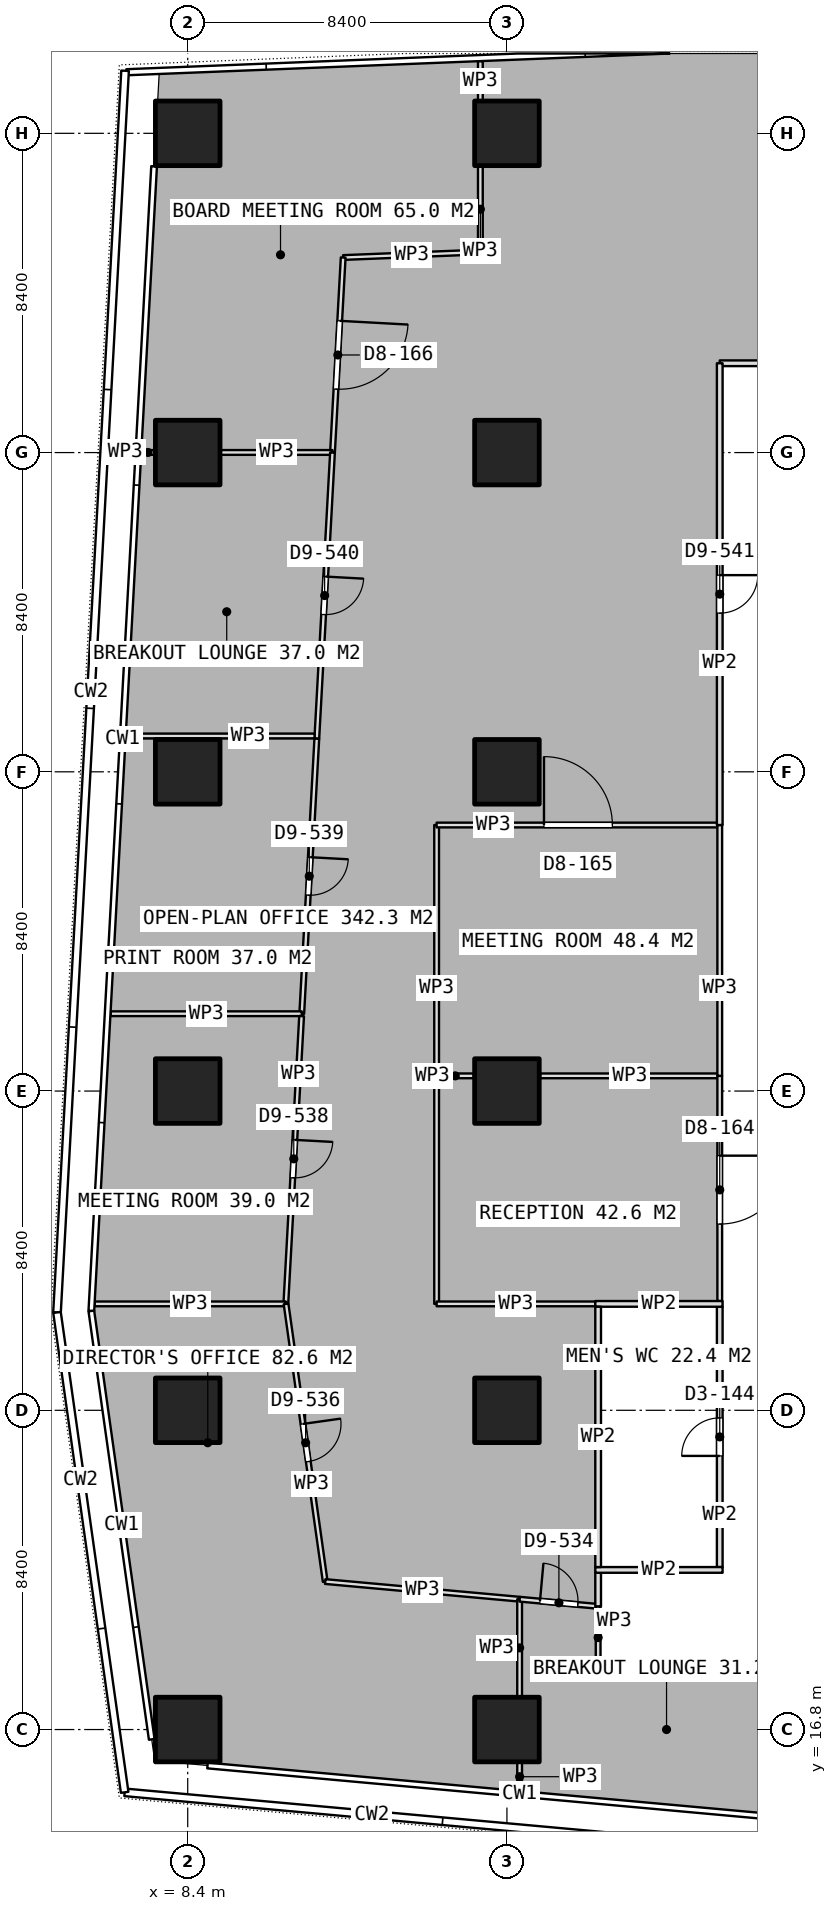
"""IFC4 building model, lengths in metres.
Left out: names, types, materials, properties, quantities, classifications, styles, units other than length and angle.
Written with IfcOpenShell. Run it as: python <this file> out.ifc"""

import sys

from ifc_helpers import new_model, si_unit, direction, frame, frame_2d, origin, origin_2d, place, context, subcontext, project, spatial, rectangle, extrude, element, fill, save


model = new_model("IFC4")
c1 = context("Model", 3, precision=1e-05, world=origin(), true_north=direction((0.0, 1.0)))
c2 = subcontext(c1, "Body", "Model", "MODEL_VIEW")
j1 = project(units=[si_unit("LENGTHUNIT", "METRE"), si_unit("PLANEANGLEUNIT", "RADIAN")], contexts=[c1])
p1 = place(None, origin())
s1 = spatial("IfcSite", under=j1, at=p1, CompositionType="ELEMENT")
p2 = place(p1, origin())
s2 = spatial("IfcBuilding", under=s1, at=p2, CompositionType="ELEMENT")
p3 = place(p2, frame((0.0, 0.0, 136.55)))
s3 = spatial("IfcBuildingStorey", under=s2, at=p3, CompositionType="ELEMENT", Elevation=136.55)
for number, where, z_axis, x_axis in (
    (1, (8.4, 16.8, 0.0), (0.0, 0.0, 1.0), (1.0, 0.0, 0.0)),
    (2, (8.4, 25.2, 0.0), (0.0, 0.0, 1.0), (1.0, 0.0, 0.0)),
    (3, (8.4, 33.6, 0.0), (0.0, 0.0, 1.0), (1.0, 0.0, 0.0)),
    (4, (8.4, 42.0, 0.0), (0.0, 0.0, 1.0), (1.0, 0.0, 0.0)),
    (5, (8.4, 50.4, 0.0), (0.0, 0.0, 1.0), (1.0, 0.0, 0.0)),
    (6, (8.4, 58.8, 0.0), (0.0, 0.0, 1.0), (1.0, 0.0, 0.0)),
    (7, (16.8, 16.8, 0.0), (0.0, 0.0, 1.0), (1.0, 0.0, 0.0)),
    (8, (16.8, 25.2, 0.0), (0.0, 0.0, 1.0), (1.0, 0.0, 0.0)),
    (9, (16.8, 33.6, 0.0), (0.0, 0.0, 1.0), (1.0, 0.0, 0.0)),
    (10, (16.8, 42.0, 0.0), (0.0, 0.0, 1.0), (1.0, 0.0, 0.0)),
    (11, (16.8, 50.4, 0.0), (0.0, 0.0, 1.0), (1.0, 0.0, 0.0)),
    (12, (16.8, 58.8, 0.0), (0.0, 0.0, 1.0), (1.0, 0.0, 0.0)),
):
    element("IfcColumn", number, at=place(p3, frame(where, z_axis=z_axis, x_axis=x_axis)), inside=s3, PredefinedType="COLUMN", context=c2, shape_type="SweptSolid", body=[
        extrude(rectangle(XDim=1.7, YDim=1.7, at=origin_2d()), origin(), (0.0, 0.0, 1.0), 3.75),
    ])
for number, where, z_axis, x_axis in (
    (13, (19.125, 21.0, 0.0), (0.0, 0.0, 1.0), (1.0, 0.0, 0.0)),
    (14, (19.125, 28.0, 0.0), (0.0, 0.0, 1.0), (1.0, 0.0, 0.0)),
):
    element("IfcWall", number, at=place(p3, frame(where, z_axis=z_axis, x_axis=x_axis)), inside=s3, PredefinedType="PARTITIONING", context=c2, shape_type="SweptSolid", body=[
        extrude(rectangle(XDim=3.35, YDim=0.15, at=frame_2d((1.675, 0.0))), origin(), (0.0, 0.0, 1.0), 3.5),
    ])
p4 = place(p3, frame((19.2, 21.075, 0.0), z_axis=(0.0, 0.0, 1.0), x_axis=(0.0, 1.0, 0.0)))
e15 = element("IfcWall", 15, at=p4, inside=s3, PredefinedType="PARTITIONING", context=c2, shape_type="SweptSolid", body=[
    extrude(rectangle(XDim=6.85, YDim=0.15, at=frame_2d((3.425, 0.0))), origin(), (0.0, 0.0, 1.0), 3.5),
])
p5 = place(p3, frame((22.4, 21.075, 0.0), z_axis=(0.0, 0.0, 1.0), x_axis=(0.0, 1.0, 0.0)))
e16 = element("IfcWall", 16, at=p5, inside=s3, PredefinedType="PARTITIONING", context=c2, shape_type="SweptSolid", body=[
    extrude(rectangle(XDim=6.85, YDim=0.15, at=frame_2d((3.425, 0.0))), origin(), (0.0, 0.0, 1.0), 3.5),
])
p6 = place(p5, frame((2.925, 0.0, 0.0)))
e17 = element("IfcOpeningElement", 17, at=p6, cuts=e16, PredefinedType="OPENING", context=c2, shape_type="SweptSolid", body=[
    extrude(rectangle(XDim=1.0, YDim=2.1, at=frame_2d((0.5, 1.05))), frame((0.0, 0.085, 0.0), z_axis=(0.0, -1.0, 0.0), x_axis=(1.0, 0.0, 0.0)), (0.0, 0.0, 1.0), 0.17),
])
p7 = place(p3, frame((16.101, 60.7, 0.0), z_axis=(0.0, 0.0, 1.0), x_axis=(0.0, -1.0, 0.0)))
e18 = element("IfcWall", 18, at=p7, inside=s3, PredefinedType="PARTITIONING", context=c2, shape_type="SweptSolid", body=[
    extrude(rectangle(XDim=1.03, YDim=0.125, at=frame_2d((0.515, 0.0))), origin(), (0.0, 0.0, 1.0), 3.5),
])
p8 = place(p3, frame((16.101, 57.93, 0.0), z_axis=(0.0, 0.0, 1.0), x_axis=(0.0, -1.0, 0.0)))
e19 = element("IfcWall", 19, at=p8, inside=s3, PredefinedType="PARTITIONING", context=c2, shape_type="SweptSolid", body=[
    extrude(rectangle(XDim=2.254, YDim=0.125, at=frame_2d((1.127, 0.0))), origin(), (0.0, 0.0, 1.0), 3.5),
])
p9 = place(p3, frame((16.101, 55.676, 0.0), z_axis=(0.0, 0.0, 1.0), x_axis=(-0.999204947676, -0.039868189567, 0.0)))
e20 = element("IfcWall", 20, at=p9, inside=s3, PredefinedType="PARTITIONING", context=c2, shape_type="SweptSolid", body=[
    extrude(rectangle(XDim=3.613, YDim=0.125, at=frame_2d((1.807, 0.0))), origin(), (0.0, 0.0, 1.0), 3.5),
])
p10 = place(p3, frame((12.491, 55.532, 0.0), z_axis=(0.0, 0.0, 1.0), x_axis=(-0.054706604425, -0.998502472422, 0.0)))
e21 = element("IfcWall", 21, at=p10, inside=s3, PredefinedType="PARTITIONING", context=c2, shape_type="SweptSolid", body=[
    extrude(rectangle(XDim=5.137, YDim=0.125, at=frame_2d((2.568, 0.0))), origin(), (0.0, 0.0, 1.0), 3.5),
])
p11 = place(p10, frame((1.668, 0.0, 0.0)))
e22 = element("IfcOpeningElement", 22, at=p11, cuts=e21, PredefinedType="OPENING", context=c2, shape_type="SweptSolid", body=[
    extrude(rectangle(XDim=1.8, YDim=2.1, at=frame_2d((0.9, 1.05))), frame((0.0, 0.073, 0.0), z_axis=(0.0, -1.0, 0.0), x_axis=(1.0, 0.0, 0.0)), (0.0, 0.0, 1.0), 0.145),
])
p12 = place(p3, frame((12.21, 50.403, 0.0), z_axis=(0.0, 0.0, 1.0), x_axis=(-1.0, 0.0, 0.0)))
e23 = element("IfcWall", 23, at=p12, inside=s3, PredefinedType="PARTITIONING", context=c2, shape_type="SweptSolid", body=[
    extrude(rectangle(XDim=2.94, YDim=0.125, at=frame_2d((1.47, 0.0))), origin(), (0.0, 0.0, 1.0), 3.5),
])
p13 = place(p3, frame((7.53, 50.403, 0.0), z_axis=(0.0, 0.0, 1.0), x_axis=(-1.0, 0.0, 0.0)))
e24 = element("IfcWall", 24, at=p13, inside=s3, PredefinedType="PARTITIONING", context=c2, shape_type="SweptSolid", body=[
    extrude(rectangle(XDim=0.347, YDim=0.125, at=frame_2d((0.173, 0.0))), origin(), (0.0, 0.0, 1.0), 3.5),
])
p14 = place(p3, frame((12.21, 50.402, 0.0), z_axis=(0.0, 0.0, 1.0), x_axis=(-0.054750918435, -0.998500043531, 0.0)))
e25 = element("IfcWall", 25, at=p14, inside=s3, PredefinedType="PARTITIONING", context=c2, shape_type="SweptSolid", body=[
    extrude(rectangle(XDim=7.54, YDim=0.125, at=frame_2d((3.77, 0.0))), origin(), (0.0, 0.0, 1.0), 3.5),
])
p15 = place(p14, frame((3.27, 0.0, 0.0)))
e26 = element("IfcOpeningElement", 26, at=p15, cuts=e25, PredefinedType="OPENING", context=c2, shape_type="SweptSolid", body=[
    extrude(rectangle(XDim=1.0, YDim=2.1, at=frame_2d((0.5, 1.05))), frame((0.0, 0.073, 0.0), z_axis=(0.0, -1.0, 0.0), x_axis=(1.0, 0.0, 0.0)), (0.0, 0.0, 1.0), 0.145),
])
p16 = place(p3, frame((11.738, 42.943, 0.0), z_axis=(0.0, 0.0, 1.0), x_axis=(-1.0, 0.0, 0.0)))
e27 = element("IfcWall", 27, at=p16, inside=s3, PredefinedType="PARTITIONING", context=c2, shape_type="SweptSolid", body=[
    extrude(rectangle(XDim=4.994, YDim=0.125, at=frame_2d((2.497, 0.0))), origin(), (0.0, 0.0, 1.0), 3.5),
])
p17 = place(p3, frame((11.797, 42.872, 0.0), z_axis=(0.0, 0.0, 1.0), x_axis=(-0.0546696622, -0.998504495751, 0.0)))
e28 = element("IfcWall", 28, at=p17, inside=s3, PredefinedType="PARTITIONING", context=c2, shape_type="SweptSolid", body=[
    extrude(rectangle(XDim=7.248, YDim=0.125, at=frame_2d((3.624, 0.0))), origin(), (0.0, 0.0, 1.0), 3.5),
])
p18 = place(p17, frame((3.124, 0.0, 0.0)))
e29 = element("IfcOpeningElement", 29, at=p18, cuts=e28, PredefinedType="OPENING", context=c2, shape_type="SweptSolid", body=[
    extrude(rectangle(XDim=1.0, YDim=2.1, at=frame_2d((0.5, 1.05))), frame((0.0, 0.073, 0.0), z_axis=(0.0, -1.0, 0.0), x_axis=(1.0, 0.0, 0.0)), (0.0, 0.0, 1.0), 0.145),
])
p19 = place(p3, frame((11.401, 35.635, 0.0), z_axis=(0.0, 0.0, 1.0), x_axis=(-1.0, 0.0, 0.0)))
e30 = element("IfcWall", 30, at=p19, inside=s3, PredefinedType="PARTITIONING", context=c2, shape_type="SweptSolid", body=[
    extrude(rectangle(XDim=5.028, YDim=0.125, at=frame_2d((2.514, 0.0))), origin(), (0.0, 0.0, 1.0), 3.5),
])
p20 = place(p3, frame((11.397, 35.572, 0.0), z_axis=(0.0, 0.0, 1.0), x_axis=(-0.054730034511, -0.998501188443, 0.0)))
e31 = element("IfcWall", 31, at=p20, inside=s3, PredefinedType="PARTITIONING", context=c2, shape_type="SweptSolid", body=[
    extrude(rectangle(XDim=7.583, YDim=0.125, at=frame_2d((3.792, 0.0))), origin(), (0.0, 0.0, 1.0), 3.5),
])
p21 = place(p20, frame((3.261, 0.0, 0.0)))
e32 = element("IfcOpeningElement", 32, at=p21, cuts=e31, PredefinedType="OPENING", context=c2, shape_type="SweptSolid", body=[
    extrude(rectangle(XDim=1.0, YDim=2.1, at=frame_2d((0.5, 1.05))), frame((0.0, 0.073, 0.0), z_axis=(0.0, -1.0, 0.0), x_axis=(1.0, 0.0, 0.0)), (0.0, 0.0, 1.0), 0.145),
])
p22 = place(p3, frame((10.982, 28.0, 0.0), z_axis=(0.0, 0.0, 1.0), x_axis=(-1.0, 0.0, 0.0)))
e33 = element("IfcWall", 33, at=p22, inside=s3, PredefinedType="PARTITIONING", context=c2, shape_type="SweptSolid", body=[
    extrude(rectangle(XDim=5.028, YDim=0.125, at=frame_2d((2.514, 0.0))), origin(), (0.0, 0.0, 1.0), 3.5),
])
p23 = place(p3, frame((10.988, 27.999, 0.0), z_axis=(0.0, 0.0, 1.0), x_axis=(0.139623458625, -0.990204670662, 0.0)))
e34 = element("IfcWall", 34, at=p23, inside=s3, PredefinedType="PARTITIONING", context=c2, shape_type="SweptSolid", body=[
    extrude(rectangle(XDim=7.377, YDim=0.125, at=frame_2d((3.688, 0.0))), origin(), (0.0, 0.0, 1.0), 3.5),
])
p24 = place(p23, frame((3.189, 0.0, 0.0)))
e35 = element("IfcOpeningElement", 35, at=p24, cuts=e34, PredefinedType="OPENING", context=c2, shape_type="SweptSolid", body=[
    extrude(rectangle(XDim=1.0, YDim=2.1, at=frame_2d((0.5, 1.05))), frame((0.0, 0.073, 0.0), z_axis=(0.0, -1.0, 0.0), x_axis=(1.0, 0.0, 0.0)), (0.0, 0.0, 1.0), 0.145),
])
p25 = place(p3, frame((12.018, 20.694, 0.0), z_axis=(0.0, 0.0, 1.0), x_axis=(0.995893206468, -0.090535746043, 0.0)))
e36 = element("IfcWall", 36, at=p25, inside=s3, PredefinedType="PARTITIONING", context=c2, shape_type="SweptSolid", body=[
    extrude(rectangle(XDim=5.137, YDim=0.125, at=frame_2d((2.568, 0.0))), origin(), (0.0, 0.0, 1.0), 3.5),
])
p26 = place(p3, frame((17.134, 20.229, 0.0), z_axis=(0.0, 0.0, 1.0), x_axis=(0.0, -1.0, 0.0)))
e37 = element("IfcWall", 37, at=p26, inside=s3, PredefinedType="PARTITIONING", context=c2, shape_type="SweptSolid", body=[
    extrude(rectangle(XDim=2.559, YDim=0.125, at=frame_2d((1.28, 0.0))), origin(), (0.0, 0.0, 1.0), 3.5),
])
p27 = place(p3, frame((17.134, 15.93, 0.0), z_axis=(0.0, 0.0, 1.0), x_axis=(0.0, -1.0, 0.0)))
e38 = element("IfcWall", 38, at=p27, inside=s3, PredefinedType="PARTITIONING", context=c2, shape_type="SweptSolid", body=[
    extrude(rectangle(XDim=0.742, YDim=0.125, at=frame_2d((0.371, 0.0))), origin(), (0.0, 0.0, 1.0), 3.5),
])
p28 = place(p3, frame((19.2, 18.4, 0.0), z_axis=(0.0, 0.0, 1.0), x_axis=(1.0, 0.0, 0.0)))
e39 = element("IfcWall", 39, at=p28, inside=s3, PredefinedType="PARTITIONING", context=c2, shape_type="SweptSolid", body=[
    extrude(rectangle(XDim=6.179, YDim=0.125, at=frame_2d((3.089, 0.0))), origin(), (0.0, 0.0, 1.0), 3.5),
])
p29 = place(p3, frame((17.135, 20.229, 0.0), z_axis=(0.0, 0.0, 1.0), x_axis=(0.995881616909, -0.090663140816, 0.0)))
e40 = element("IfcWall", 40, at=p29, inside=s3, PredefinedType="PARTITIONING", context=c2, shape_type="SweptSolid", body=[
    extrude(rectangle(XDim=2.073, YDim=0.125, at=frame_2d((1.037, 0.0))), origin(), (0.0, 0.0, 1.0), 3.5),
])
p30 = place(p29, frame((0.537, 0.0, 0.0)))
e41 = element("IfcOpeningElement", 41, at=p30, cuts=e40, PredefinedType="OPENING", context=c2, shape_type="SweptSolid", body=[
    extrude(rectangle(XDim=1.0, YDim=2.1, at=frame_2d((0.5, 1.05))), frame((0.0, 0.073, 0.0), z_axis=(0.0, -1.0, 0.0), x_axis=(1.0, 0.0, 0.0)), (0.0, 0.0, 1.0), 0.145),
])
p31 = place(p3, frame((19.2, 20.041, 0.0), z_axis=(0.0, 0.0, 1.0), x_axis=(0.0, -1.0, 0.0)))
e42 = element("IfcWall", 42, at=p31, inside=s3, PredefinedType="PARTITIONING", context=c2, shape_type="SweptSolid", body=[
    extrude(rectangle(XDim=1.641, YDim=0.125, at=frame_2d((0.821, 0.0))), origin(), (0.0, 0.0, 1.0), 3.5),
])
p32 = place(p3, frame((14.95, 28.0, 0.0), z_axis=(0.0, 0.0, 1.0), x_axis=(0.0, 1.0, 0.0)))
e43 = element("IfcWall", 43, at=p32, inside=s3, PredefinedType="PARTITIONING", context=c2, shape_type="SweptSolid", body=[
    extrude(rectangle(XDim=6.0, YDim=0.125, at=frame_2d((3.0, 0.0))), origin(), (0.0, 0.0, 1.0), 3.5),
])
p33 = place(p3, frame((14.95, 34.0, 0.0), z_axis=(0.0, 0.0, 1.0), x_axis=(1.0, 0.0, 0.0)))
e44 = element("IfcWall", 44, at=p33, inside=s3, PredefinedType="PARTITIONING", context=c2, shape_type="SweptSolid", body=[
    extrude(rectangle(XDim=0.98, YDim=0.125, at=frame_2d((0.49, 0.0))), origin(), (0.0, 0.0, 1.0), 3.5),
])
p34 = place(p3, frame((17.67, 34.0, 0.0), z_axis=(0.0, 0.0, 1.0), x_axis=(1.0, 0.0, 0.0)))
e45 = element("IfcWall", 45, at=p34, inside=s3, PredefinedType="PARTITIONING", context=c2, shape_type="SweptSolid", body=[
    extrude(rectangle(XDim=4.73, YDim=0.125, at=frame_2d((2.365, 0.0))), origin(), (0.0, 0.0, 1.0), 3.5),
])
p35 = place(p3, frame((22.4, 34.0, 0.0), z_axis=(0.0, 0.0, 1.0), x_axis=(0.0, -1.0, 0.0)))
e46 = element("IfcWall", 46, at=p35, inside=s3, PredefinedType="PARTITIONING", context=c2, shape_type="SweptSolid", body=[
    extrude(rectangle(XDim=5.925, YDim=0.125, at=frame_2d((2.962, 0.0))), origin(), (0.0, 0.0, 1.0), 3.5),
])
p36 = place(p35, frame((2.1, 0.0, 0.0)))
e47 = element("IfcOpeningElement", 47, at=p36, cuts=e46, PredefinedType="OPENING", context=c2, shape_type="SweptSolid", body=[
    extrude(rectangle(XDim=1.8, YDim=2.1, at=frame_2d((0.9, 1.05))), frame((0.0, 0.073, 0.0), z_axis=(0.0, -1.0, 0.0), x_axis=(1.0, 0.0, 0.0)), (0.0, 0.0, 1.0), 0.145),
])
p37 = place(p3, frame((19.125, 28.0, 0.0), z_axis=(0.0, 0.0, 1.0), x_axis=(-1.0, 0.0, 0.0)))
e48 = element("IfcWall", 48, at=p37, inside=s3, PredefinedType="PARTITIONING", context=c2, shape_type="SweptSolid", body=[
    extrude(rectangle(XDim=4.175, YDim=0.125, at=frame_2d((2.087, 0.0))), origin(), (0.0, 0.0, 1.0), 3.5),
])
p38 = place(p3, frame((14.95, 34.0, 0.0), z_axis=(0.0, 0.0, 1.0), x_axis=(0.0, 1.0, 0.0)))
e49 = element("IfcWall", 49, at=p38, inside=s3, PredefinedType="PARTITIONING", context=c2, shape_type="SweptSolid", body=[
    extrude(rectangle(XDim=6.6, YDim=0.125, at=frame_2d((3.3, 0.0))), origin(), (0.0, 0.0, 1.0), 3.5),
])
p39 = place(p3, frame((14.95, 40.6, 0.0), z_axis=(0.0, 0.0, 1.0), x_axis=(1.0, 0.0, 0.0)))
e50 = element("IfcWall", 50, at=p39, inside=s3, PredefinedType="PARTITIONING", context=c2, shape_type="SweptSolid", body=[
    extrude(rectangle(XDim=7.45, YDim=0.125, at=frame_2d((3.725, 0.0))), origin(), (0.0, 0.0, 1.0), 3.5),
])
p40 = place(p39, frame((2.825, 0.0, 0.0)))
e51 = element("IfcOpeningElement", 51, at=p40, cuts=e50, PredefinedType="OPENING", context=c2, shape_type="SweptSolid", body=[
    extrude(rectangle(XDim=1.8, YDim=2.1, at=frame_2d((0.9, 1.05))), frame((0.0, 0.073, 0.0), z_axis=(0.0, -1.0, 0.0), x_axis=(1.0, 0.0, 0.0)), (0.0, 0.0, 1.0), 0.145),
])
p41 = place(p3, frame((22.4, 40.6, 0.0), z_axis=(0.0, 0.0, 1.0), x_axis=(0.0, -1.0, 0.0)))
e52 = element("IfcWall", 52, at=p41, inside=s3, PredefinedType="PARTITIONING", context=c2, shape_type="SweptSolid", body=[
    extrude(rectangle(XDim=6.6, YDim=0.125, at=frame_2d((3.3, 0.0))), origin(), (0.0, 0.0, 1.0), 3.5),
])
p42 = place(p3, frame((33.826, 52.75, 0.0), z_axis=(0.0, 0.0, 1.0), x_axis=(-1.0, 0.0, 0.0)))
e53 = element("IfcWall", 53, at=p42, inside=s3, PredefinedType="PARTITIONING", context=c2, shape_type="SweptSolid", body=[
    extrude(rectangle(XDim=11.426, YDim=0.15, at=frame_2d((5.713, 0.0))), origin(), (0.0, 0.0, 1.0), 3.5),
])
p43 = place(p3, frame((22.4, 52.75, 0.0), z_axis=(0.0, 0.0, 1.0), x_axis=(0.0, -1.0, 0.0)))
e54 = element("IfcWall", 54, at=p43, inside=s3, PredefinedType="PARTITIONING", context=c2, shape_type="SweptSolid", body=[
    extrude(rectangle(XDim=12.15, YDim=0.15, at=frame_2d((6.075, 0.0))), origin(), (0.0, 0.0, 1.0), 3.5),
])
p44 = place(p43, frame((5.575, 0.0, 0.0)))
e55 = element("IfcOpeningElement", 55, at=p44, cuts=e54, PredefinedType="OPENING", context=c2, shape_type="SweptSolid", body=[
    extrude(rectangle(XDim=1.0, YDim=2.1, at=frame_2d((0.5, 1.05))), frame((0.0, 0.085, 0.0), z_axis=(0.0, -1.0, 0.0), x_axis=(1.0, 0.0, 0.0)), (0.0, 0.0, 1.0), 0.17),
])
p45 = place(p3, frame((19.2, 20.925, 0.0), z_axis=(0.0, 0.0, 1.0), x_axis=(0.0, -1.0, 0.0)))
e56 = element("IfcWall", 56, at=p45, inside=s3, PredefinedType="PARTITIONING", context=c2, shape_type="SweptSolid", body=[
    extrude(rectangle(XDim=0.884, YDim=0.15, at=frame_2d((0.442, 0.0))), origin(), (0.0, 0.0, 1.0), 3.5),
])
p46 = place(p6, origin())
e57 = element("IfcDoor", 57, at=p46, inside=s3, OperationType="SINGLE_SWING_LEFT", PredefinedType="DOOR", context=c2, shape_type="SweptSolid", body=[
    extrude(rectangle(XDim=1.0, YDim=2.1, at=frame_2d((0.5, 1.05))), frame((0.0, 0.025, 0.0), z_axis=(0.0, -1.0, 0.0), x_axis=(1.0, 0.0, 0.0)), (0.0, 0.0, 1.0), 0.05),
])
fill(e17, e57)
p47 = place(p11, origin())
e58 = element("IfcDoor", 58, at=p47, inside=s3, OperationType="DOUBLE_DOOR_SINGLE_SWING", PredefinedType="DOOR", context=c2, shape_type="SweptSolid", body=[
    extrude(rectangle(XDim=1.8, YDim=2.1, at=frame_2d((0.9, 1.05))), frame((0.0, 0.025, 0.0), z_axis=(0.0, -1.0, 0.0), x_axis=(1.0, 0.0, 0.0)), (0.0, 0.0, 1.0), 0.05),
])
fill(e22, e58)
p48 = place(p15, origin())
e59 = element("IfcDoor", 59, at=p48, inside=s3, OperationType="SINGLE_SWING_LEFT", PredefinedType="DOOR", context=c2, shape_type="SweptSolid", body=[
    extrude(rectangle(XDim=1.0, YDim=2.1, at=frame_2d((0.5, 1.05))), frame((0.0, 0.025, 0.0), z_axis=(0.0, -1.0, 0.0), x_axis=(1.0, 0.0, 0.0)), (0.0, 0.0, 1.0), 0.05),
])
fill(e26, e59)
p49 = place(p18, origin())
e60 = element("IfcDoor", 60, at=p49, inside=s3, OperationType="SINGLE_SWING_LEFT", PredefinedType="DOOR", context=c2, shape_type="SweptSolid", body=[
    extrude(rectangle(XDim=1.0, YDim=2.1, at=frame_2d((0.5, 1.05))), frame((0.0, 0.025, 0.0), z_axis=(0.0, -1.0, 0.0), x_axis=(1.0, 0.0, 0.0)), (0.0, 0.0, 1.0), 0.05),
])
fill(e29, e60)
p50 = place(p21, origin())
e61 = element("IfcDoor", 61, at=p50, inside=s3, OperationType="SINGLE_SWING_LEFT", PredefinedType="DOOR", context=c2, shape_type="SweptSolid", body=[
    extrude(rectangle(XDim=1.0, YDim=2.1, at=frame_2d((0.5, 1.05))), frame((0.0, 0.025, 0.0), z_axis=(0.0, -1.0, 0.0), x_axis=(1.0, 0.0, 0.0)), (0.0, 0.0, 1.0), 0.05),
])
fill(e32, e61)
p51 = place(p24, origin())
e62 = element("IfcDoor", 62, at=p51, inside=s3, OperationType="SINGLE_SWING_LEFT", PredefinedType="DOOR", context=c2, shape_type="SweptSolid", body=[
    extrude(rectangle(XDim=1.0, YDim=2.1, at=frame_2d((0.5, 1.05))), frame((0.0, 0.025, 0.0), z_axis=(0.0, -1.0, 0.0), x_axis=(1.0, 0.0, 0.0)), (0.0, 0.0, 1.0), 0.05),
])
fill(e35, e62)
p52 = place(p30, origin())
e63 = element("IfcDoor", 63, at=p52, inside=s3, OperationType="SINGLE_SWING_LEFT", PredefinedType="DOOR", context=c2, shape_type="SweptSolid", body=[
    extrude(rectangle(XDim=1.0, YDim=2.1, at=frame_2d((0.5, 1.05))), frame((0.0, 0.025, 0.0), z_axis=(0.0, -1.0, 0.0), x_axis=(1.0, 0.0, 0.0)), (0.0, 0.0, 1.0), 0.05),
])
fill(e41, e63)
p53 = place(p36, origin())
e64 = element("IfcDoor", 64, at=p53, inside=s3, OperationType="DOUBLE_DOOR_SINGLE_SWING", PredefinedType="DOOR", context=c2, shape_type="SweptSolid", body=[
    extrude(rectangle(XDim=1.8, YDim=2.1, at=frame_2d((0.9, 1.05))), frame((0.0, 0.025, 0.0), z_axis=(0.0, -1.0, 0.0), x_axis=(1.0, 0.0, 0.0)), (0.0, 0.0, 1.0), 0.05),
])
fill(e47, e64)
p54 = place(p40, origin())
e65 = element("IfcDoor", 65, at=p54, inside=s3, OperationType="DOUBLE_DOOR_SINGLE_SWING", PredefinedType="DOOR", context=c2, shape_type="SweptSolid", body=[
    extrude(rectangle(XDim=1.8, YDim=2.1, at=frame_2d((0.9, 1.05))), frame((0.0, 0.025, 0.0), z_axis=(0.0, -1.0, 0.0), x_axis=(1.0, 0.0, 0.0)), (0.0, 0.0, 1.0), 0.05),
])
fill(e51, e65)
p55 = place(p44, origin())
e66 = element("IfcDoor", 66, at=p55, inside=s3, OperationType="SINGLE_SWING_LEFT", PredefinedType="DOOR", context=c2, shape_type="SweptSolid", body=[
    extrude(rectangle(XDim=1.0, YDim=2.1, at=frame_2d((0.5, 1.05))), frame((0.0, 0.025, 0.0), z_axis=(0.0, -1.0, 0.0), x_axis=(1.0, 0.0, 0.0)), (0.0, 0.0, 1.0), 0.05),
])
fill(e55, e66)
save(model, sys.argv[1])
